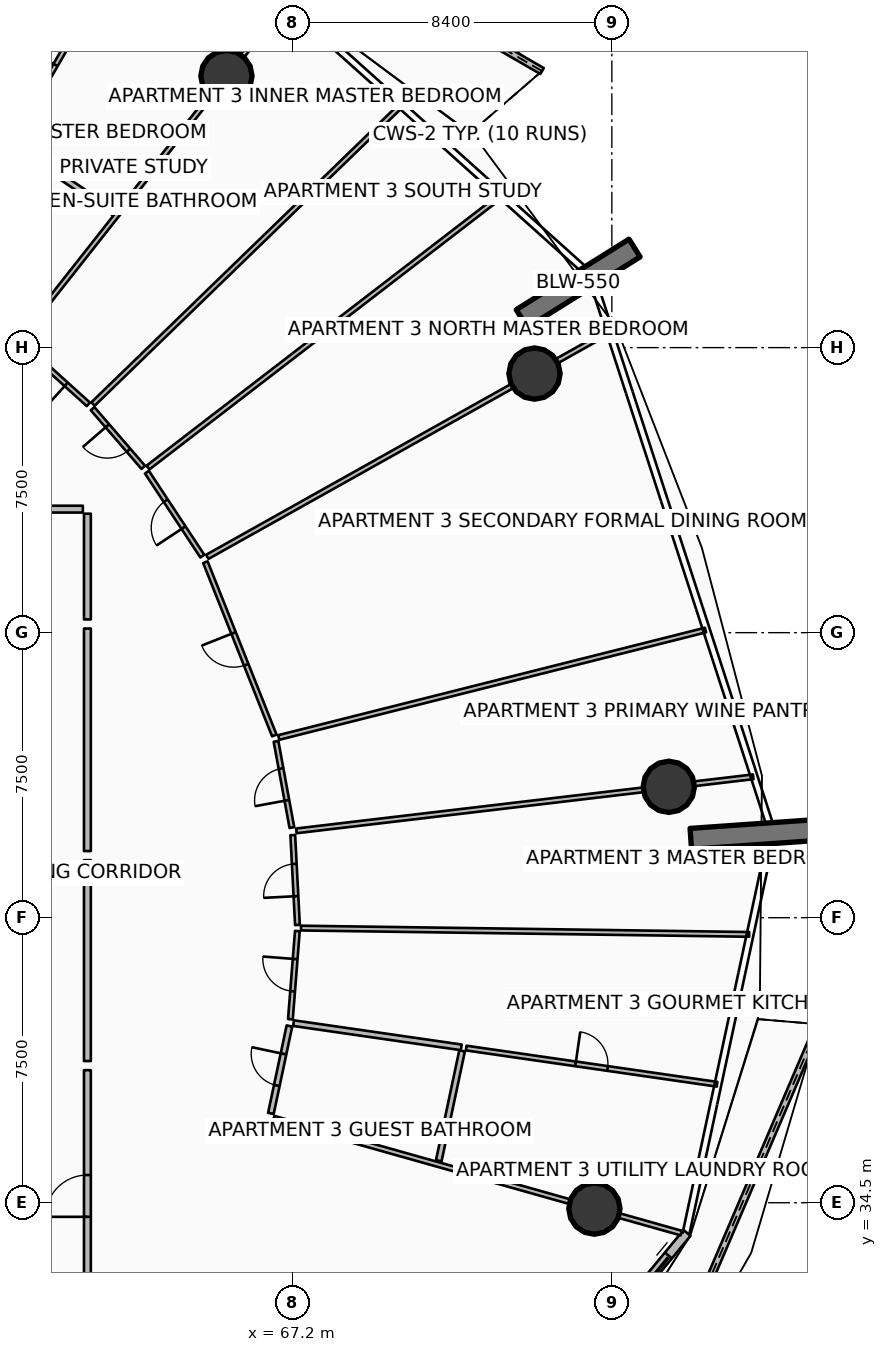
"""IFC4 building model, lengths in metres.
Left out: names, types, materials, properties, quantities, classifications, styles, units other than length and angle.
Written with IfcOpenShell. Run it as: python <this file> out.ifc"""

import sys

from ifc_helpers import new_model, si_unit, direction, frame, frame_2d, origin, origin_2d, place, context, subcontext, project, spatial, polyline, rectangle, circle, outline, extrude, element, fill, save


model = new_model("IFC4")
c1 = context("Model", 3, precision=1e-05, world=origin(), true_north=direction((0.0, 1.0)))
c2 = subcontext(c1, "Body", "Model", "MODEL_VIEW")
j1 = project(units=[si_unit("LENGTHUNIT", "METRE"), si_unit("PLANEANGLEUNIT", "RADIAN")], contexts=[c1])
p1 = place(None, origin())
s1 = spatial("IfcSite", under=j1, at=p1, CompositionType="ELEMENT")
p2 = place(p1, origin())
s2 = spatial("IfcBuilding", under=s1, at=p2, CompositionType="ELEMENT")
p3 = place(p2, frame((0.0, 0.0, 41.4)))
s3 = spatial("IfcBuildingStorey", under=s2, at=p3, CompositionType="ELEMENT", Elevation=41.4)
for number, where, z_axis, x_axis in (
    (1, (73.23, 57.765, 0.0), (0.0, 0.0, 1.0), (0.848, 0.53, 0.0)),
    (2, (77.678, 44.075, 0.0), (0.0, 0.0, 1.0), (0.998, 0.07, 0.0)),
):
    element("IfcWall", number, at=place(p3, frame(where, z_axis=z_axis, x_axis=x_axis)), inside=s3, PredefinedType="SOLIDWALL", context=c2, shape_type="SweptSolid", body=[
        extrude(rectangle(XDim=3.5, YDim=0.55, at=frame_2d((1.75, 0.0))), origin(), (0.0, 0.0, 1.0), 3.75),
    ])
for number, where, z_axis, x_axis in (
    (3, (73.565, 56.317, 0.0), (0.0, 0.0, 1.0), (1.0, 0.0, 0.0)),
    (4, (65.458, 64.146, 0.0), (0.0, 0.0, 1.0), (1.0, 0.0, 0.0)),
    (5, (75.141, 34.345, 0.0), (0.0, 0.0, 1.0), (1.0, 0.0, 0.0)),
    (6, (77.098, 45.444, 0.0), (0.0, 0.0, 1.0), (1.0, 0.0, 0.0)),
):
    element("IfcColumn", number, at=place(p3, frame(where, z_axis=z_axis, x_axis=x_axis)), inside=s3, PredefinedType="COLUMN", context=c2, shape_type="SweptSolid", body=[
        extrude(circle(Radius=0.675, at=origin_2d()), origin(), (0.0, 0.0, 1.0), 3.5),
    ])
p4 = place(p3, frame((73.764, 64.278, 0.0), z_axis=(0.0, 0.0, 1.0), x_axis=(-0.865601166392, 0.500734081865, 0.0)))
e7 = element("IfcWall", 7, at=p4, inside=s3, PredefinedType="PARAPET", context=c2, shape_type="SweptSolid", body=[
    extrude(outline(polyline([(0.0, 0.0), (12.74, 0.0), (12.74, 1.832), (6.37, 1.853), (0.0, 1.756), (0.0, 0.0)])), frame((0.0, 0.09, 0.0), z_axis=(0.0, -1.0, 0.0), x_axis=(1.0, 0.0, 0.0)), (0.0, 0.0, 1.0), 0.18),
])
p5 = place(p3, frame((76.159, 27.786, 0.0), z_axis=(0.0, 0.0, 1.0), x_axis=(0.393762615554, 0.919212164079, 0.0)))
e8 = element("IfcWall", 8, at=p5, inside=s3, PredefinedType="PARAPET", context=c2, shape_type="SweptSolid", body=[
    extrude(outline(polyline([(0.0, 0.0), (12.412, 0.0), (12.412, 1.12), (6.206, 1.182), (0.0, 1.348), (0.0, 0.0)])), frame((0.0, 0.09, 0.0), z_axis=(0.0, -1.0, 0.0), x_axis=(1.0, 0.0, 0.0)), (0.0, 0.0, 1.0), 0.18),
])
p6 = place(p3, frame((70.033, 24.567, 0.0), z_axis=(0.0, 0.0, 1.0), x_axis=(0.636674332663, 0.771132799281, 0.0)))
e9 = element("IfcWall", 9, at=p6, inside=s3, PredefinedType="SOLIDWALL", context=c2, shape_type="SweptSolid", body=[
    extrude(rectangle(XDim=11.851, YDim=0.24, at=frame_2d((5.926, 0.0))), origin(), (0.0, 0.0, 1.0), 2.45),
])
p7 = place(p6, frame((9.631, 0.0, 0.0)))
e10 = element("IfcOpeningElement", 10, at=p7, cuts=e9, PredefinedType="OPENING", context=c2, shape_type="SweptSolid", body=[
    extrude(rectangle(XDim=1.45, YDim=2.15, at=frame_2d((0.725, 1.075))), frame((0.0, 0.13, 0.0), z_axis=(0.0, -1.0, 0.0), x_axis=(1.0, 0.0, 0.0)), (0.0, 0.0, 1.0), 0.26),
])
p8 = place(p6, frame((0.28, 0.0, 0.65)))
e11 = element("IfcOpeningElement", 11, at=p8, cuts=e9, PredefinedType="OPENING", context=c2, shape_type="SweptSolid", body=[
    extrude(rectangle(XDim=1.6, YDim=1.5, at=frame_2d((0.8, 0.75))), frame((0.0, 0.13, 0.0), z_axis=(0.0, -1.0, 0.0), x_axis=(1.0, 0.0, 0.0)), (0.0, 0.0, 1.0), 0.26),
])
p9 = place(p3, frame((61.8, 31.37, 0.0), z_axis=(0.0, 0.0, 1.0), x_axis=(0.0, 1.0, 0.0)))
e12 = element("IfcWall", 12, at=p9, inside=s3, PredefinedType="PARTITIONING", context=c2, shape_type="SweptSolid", body=[
    extrude(rectangle(XDim=6.618, YDim=0.18, at=frame_2d((3.309, 0.0))), origin(), (0.0, 0.0, 1.0), 2.867),
])
p10 = place(p9, frame((2.759, 0.0, 0.0)))
e13 = element("IfcOpeningElement", 13, at=p10, cuts=e12, PredefinedType="OPENING", context=c2, shape_type="SweptSolid", body=[
    extrude(rectangle(XDim=1.1, YDim=2.1, at=frame_2d((0.55, 1.05))), frame((0.0, 0.1, 0.0), z_axis=(0.0, -1.0, 0.0), x_axis=(1.0, 0.0, 0.0)), (0.0, 0.0, 1.0), 0.2),
])
p11 = place(p3, frame((61.8, 38.228, 0.0), z_axis=(0.0, 0.0, 1.0), x_axis=(0.0, 1.0, 0.0)))
e14 = element("IfcWall", 14, at=p11, inside=s3, PredefinedType="PARTITIONING", context=c2, shape_type="SweptSolid", body=[
    extrude(rectangle(XDim=5.285, YDim=0.18, at=frame_2d((2.643, 0.0))), origin(), (0.0, 0.0, 1.0), 2.867),
])
p12 = place(p3, frame((66.703, 36.725, 0.0), z_axis=(0.0, 0.0, 1.0), x_axis=(0.962456868727, -0.271434662195, 0.0)))
e15 = element("IfcWall", 15, at=p12, inside=s3, PredefinedType="PARTITIONING", context=c2, shape_type="SweptSolid", body=[
    extrude(rectangle(XDim=11.141, YDim=0.125, at=frame_2d((5.571, 0.0))), origin(), (0.0, 0.0, 1.0), 2.867),
])
p13 = place(p3, frame((66.628, 36.85, 0.0), z_axis=(0.0, 0.0, 1.0), x_axis=(0.207543347309, 0.978225822082, 0.0)))
e16 = element("IfcWall", 16, at=p13, inside=s3, PredefinedType="PARTITIONING", context=c2, shape_type="SweptSolid", body=[
    extrude(rectangle(XDim=2.352, YDim=0.15, at=frame_2d((1.176, 0.0))), origin(), (0.0, 0.0, 1.0), 2.867),
])
p14 = place(p13, frame((0.751, 0.0, 0.0)))
e17 = element("IfcOpeningElement", 17, at=p14, cuts=e16, PredefinedType="OPENING", context=c2, shape_type="SweptSolid", body=[
    extrude(rectangle(XDim=0.85, YDim=2.06, at=frame_2d((0.425, 1.03))), frame((0.0, 0.085, 0.0), z_axis=(0.0, -1.0, 0.0), x_axis=(1.0, 0.0, 0.0)), (0.0, 0.0, 1.0), 0.17),
])
p15 = place(p3, frame((71.046, 35.604, 0.0), z_axis=(0.0, 0.0, 1.0), x_axis=(0.207542541756, 0.97822599299, 0.0)))
e18 = element("IfcWall", 18, at=p15, inside=s3, PredefinedType="PARTITIONING", context=c2, shape_type="SweptSolid", body=[
    extrude(rectangle(XDim=2.955, YDim=0.15, at=frame_2d((1.478, 0.0))), origin(), (0.0, 0.0, 1.0), 2.867),
])
p16 = place(p3, frame((67.224, 39.226, 0.0), z_axis=(0.0, 0.0, 1.0), x_axis=(0.989741519473, -0.142869607092, 0.0)))
e19 = element("IfcWall", 19, at=p16, inside=s3, PredefinedType="PARTITIONING", context=c2, shape_type="SweptSolid", body=[
    extrude(rectangle(XDim=4.46, YDim=0.15, at=frame_2d((2.23, 0.0))), origin(), (0.0, 0.0, 1.0), 2.94),
])
p17 = place(p3, frame((71.767, 38.57, 0.0), z_axis=(0.0, 0.0, 1.0), x_axis=(0.989747166196, -0.142830483468, 0.0)))
e20 = element("IfcWall", 20, at=p17, inside=s3, PredefinedType="PARTITIONING", context=c2, shape_type="SweptSolid", body=[
    extrude(rectangle(XDim=6.67, YDim=0.125, at=frame_2d((3.335, 0.0))), origin(), (0.0, 0.0, 1.0), 2.94),
])
p18 = place(p17, frame((2.91, 0.0, 0.0)))
e21 = element("IfcOpeningElement", 21, at=p18, cuts=e20, PredefinedType="OPENING", context=c2, shape_type="SweptSolid", body=[
    extrude(rectangle(XDim=0.85, YDim=2.06, at=frame_2d((0.425, 1.03))), frame((0.0, 0.073, 0.0), z_axis=(0.0, -1.0, 0.0), x_axis=(1.0, 0.0, 0.0)), (0.0, 0.0, 1.0), 0.145),
])
p19 = place(p3, frame((67.421, 41.727, 0.0), z_axis=(0.0, 0.0, 1.0), x_axis=(0.999900926594, -0.014076114402, 0.0)))
e22 = element("IfcWall", 22, at=p19, inside=s3, PredefinedType="PARTITIONING", context=c2, shape_type="SweptSolid", body=[
    extrude(rectangle(XDim=11.794, YDim=0.125, at=frame_2d((5.897, 0.0))), origin(), (0.0, 0.0, 1.0), 2.94),
])
p20 = place(p3, frame((67.142, 39.328, 0.0), z_axis=(0.0, 0.0, 1.0), x_axis=(0.078573538032, 0.996908320319, 0.0)))
e23 = element("IfcWall", 23, at=p20, inside=s3, PredefinedType="PARTITIONING", context=c2, shape_type="SweptSolid", body=[
    extrude(rectangle(XDim=2.327, YDim=0.125, at=frame_2d((1.164, 0.0))), origin(), (0.0, 0.0, 1.0), 2.94),
])
p21 = place(p20, frame((0.739, 0.0, 0.0)))
e24 = element("IfcOpeningElement", 24, at=p21, cuts=e23, PredefinedType="OPENING", context=c2, shape_type="SweptSolid", body=[
    extrude(rectangle(XDim=0.85, YDim=2.06, at=frame_2d((0.425, 1.03))), frame((0.0, 0.073, 0.0), z_axis=(0.0, -1.0, 0.0), x_axis=(1.0, 0.0, 0.0)), (0.0, 0.0, 1.0), 0.145),
])
p22 = place(p3, frame((67.327, 41.808, 0.0), z_axis=(0.0, 0.0, 1.0), x_axis=(-0.05186073985, 0.998654326412, 0.0)))
e25 = element("IfcWall", 25, at=p22, inside=s3, PredefinedType="PARTITIONING", context=c2, shape_type="SweptSolid", body=[
    extrude(rectangle(XDim=2.368, YDim=0.125, at=frame_2d((1.184, 0.0))), origin(), (0.0, 0.0, 1.0), 2.867),
])
p23 = place(p22, frame((0.759, 0.0, 0.0)))
e26 = element("IfcOpeningElement", 26, at=p23, cuts=e25, PredefinedType="OPENING", context=c2, shape_type="SweptSolid", body=[
    extrude(rectangle(XDim=0.85, YDim=2.06, at=frame_2d((0.425, 1.03))), frame((0.0, 0.073, 0.0), z_axis=(0.0, -1.0, 0.0), x_axis=(1.0, 0.0, 0.0)), (0.0, 0.0, 1.0), 0.145),
])
p24 = place(p3, frame((61.8, 43.753, 0.0), z_axis=(0.0, 0.0, 1.0), x_axis=(0.0, 1.0, 0.0)))
e27 = element("IfcWall", 27, at=p24, inside=s3, PredefinedType="PARTITIONING", context=c2, shape_type="SweptSolid", body=[
    extrude(rectangle(XDim=5.855, YDim=0.18, at=frame_2d((2.927, 0.0))), origin(), (0.0, 0.0, 1.0), 2.867),
])
p25 = place(p3, frame((67.298, 44.284, 0.0), z_axis=(0.0, 0.0, 1.0), x_axis=(0.993068589749, 0.117536275483, 0.0)))
e28 = element("IfcWall", 28, at=p25, inside=s3, PredefinedType="PARTITIONING", context=c2, shape_type="SweptSolid", body=[
    extrude(rectangle(XDim=12.106, YDim=0.125, at=frame_2d((6.053, 0.0))), origin(), (0.0, 0.0, 1.0), 2.867),
])
p26 = place(p3, frame((66.835, 46.742, 0.0), z_axis=(0.0, 0.0, 1.0), x_axis=(0.96974434054, 0.244122743698, 0.0)))
e29 = element("IfcWall", 29, at=p26, inside=s3, PredefinedType="PARTITIONING", context=c2, shape_type="SweptSolid", body=[
    extrude(rectangle(XDim=11.58, YDim=0.125, at=frame_2d((5.79, 0.0))), origin(), (0.0, 0.0, 1.0), 2.94),
])
p27 = place(p3, frame((67.181, 44.371, 0.0), z_axis=(0.0, 0.0, 1.0), x_axis=(-0.181165121265, 0.98345269273, 0.0)))
e30 = element("IfcWall", 30, at=p27, inside=s3, PredefinedType="PARTITIONING", context=c2, shape_type="SweptSolid", body=[
    extrude(rectangle(XDim=2.308, YDim=0.125, at=frame_2d((1.154, 0.0))), origin(), (0.0, 0.0, 1.0), 2.867),
])
p28 = place(p27, frame((0.729, 0.0, 0.0)))
e31 = element("IfcOpeningElement", 31, at=p28, cuts=e30, PredefinedType="OPENING", context=c2, shape_type="SweptSolid", body=[
    extrude(rectangle(XDim=0.85, YDim=2.06, at=frame_2d((0.425, 1.03))), frame((0.0, 0.073, 0.0), z_axis=(0.0, -1.0, 0.0), x_axis=(1.0, 0.0, 0.0)), (0.0, 0.0, 1.0), 0.145),
])
p29 = place(p3, frame((66.719, 46.794, 0.0), z_axis=(0.0, 0.0, 1.0), x_axis=(-0.369571376039, 0.929202345032, 0.0)))
e32 = element("IfcWall", 32, at=p29, inside=s3, PredefinedType="PARTITIONING", context=c2, shape_type="SweptSolid", body=[
    extrude(rectangle(XDim=4.907, YDim=0.125, at=frame_2d((2.454, 0.0))), origin(), (0.0, 0.0, 1.0), 2.867),
])
p30 = place(p29, frame((2.004, 0.0, 0.0)))
e33 = element("IfcOpeningElement", 33, at=p30, cuts=e32, PredefinedType="OPENING", context=c2, shape_type="SweptSolid", body=[
    extrude(rectangle(XDim=0.9, YDim=2.08, at=frame_2d((0.45, 1.04))), frame((0.0, 0.073, 0.0), z_axis=(0.0, -1.0, 0.0), x_axis=(1.0, 0.0, 0.0)), (0.0, 0.0, 1.0), 0.145),
])
p31 = place(p3, frame((61.8, 49.848, 0.0), z_axis=(0.0, 0.0, 1.0), x_axis=(0.0, 1.0, 0.0)))
e34 = element("IfcWall", 34, at=p31, inside=s3, PredefinedType="PARTITIONING", context=c2, shape_type="SweptSolid", body=[
    extrude(rectangle(XDim=2.781, YDim=0.18, at=frame_2d((1.391, 0.0))), origin(), (0.0, 0.0, 1.0), 2.867),
])
p32 = place(p3, frame((61.68, 52.75, 0.0), z_axis=(0.0, 0.0, 1.0), x_axis=(-1.0, 0.0, 0.0)))
e35 = element("IfcWall", 35, at=p32, inside=s3, PredefinedType="PARTITIONING", context=c2, shape_type="SweptSolid", body=[
    extrude(rectangle(XDim=5.085, YDim=0.18, at=frame_2d((2.543, 0.0))), origin(), (0.0, 0.0, 1.0), 2.867),
])
p33 = place(p3, frame((64.955, 51.495, 0.0), z_axis=(0.0, 0.0, 1.0), x_axis=(0.872499825659, 0.488614422857, 0.0)))
e36 = element("IfcWall", 36, at=p33, inside=s3, PredefinedType="PARTITIONING", context=c2, shape_type="SweptSolid", body=[
    extrude(rectangle(XDim=12.106, YDim=0.125, at=frame_2d((6.053, 0.0))), origin(), (0.0, 0.0, 1.0), 2.867),
])
p34 = place(p3, frame((63.394, 53.844, 0.0), z_axis=(0.0, 0.0, 1.0), x_axis=(0.792561224619, 0.609792345992, 0.0)))
e37 = element("IfcWall", 37, at=p34, inside=s3, PredefinedType="PARTITIONING", context=c2, shape_type="SweptSolid", body=[
    extrude(rectangle(XDim=11.714, YDim=0.125, at=frame_2d((5.857, 0.0))), origin(), (0.0, 0.0, 1.0), 2.94),
])
p35 = place(p3, frame((61.948, 55.517, 0.0), z_axis=(0.0, 0.0, 1.0), x_axis=(0.718127497198, 0.69591155887, 0.0)))
e38 = element("IfcWall", 38, at=p35, inside=s3, PredefinedType="PARTITIONING", context=c2, shape_type="SweptSolid", body=[
    extrude(rectangle(XDim=11.264, YDim=0.125, at=frame_2d((5.632, 0.0))), origin(), (0.0, 0.0, 1.0), 2.94),
])
p36 = place(p3, frame((64.824, 51.513, 0.0), z_axis=(0.0, 0.0, 1.0), x_axis=(-0.550627570513, 0.834751027906, 0.0)))
e39 = element("IfcWall", 39, at=p36, inside=s3, PredefinedType="PARTITIONING", context=c2, shape_type="SweptSolid", body=[
    extrude(rectangle(XDim=2.646, YDim=0.125, at=frame_2d((1.323, 0.0))), origin(), (0.0, 0.0, 1.0), 2.867),
])
p37 = place(p36, frame((0.898, 0.0, 0.0)))
e40 = element("IfcOpeningElement", 40, at=p37, cuts=e39, PredefinedType="OPENING", context=c2, shape_type="SweptSolid", body=[
    extrude(rectangle(XDim=0.85, YDim=2.06, at=frame_2d((0.425, 1.03))), frame((0.0, 0.073, 0.0), z_axis=(0.0, -1.0, 0.0), x_axis=(1.0, 0.0, 0.0)), (0.0, 0.0, 1.0), 0.145),
])
p38 = place(p3, frame((63.27, 53.85, 0.0), z_axis=(0.0, 0.0, 1.0), x_axis=(-0.653978023322, 0.756513545822, 0.0)))
e41 = element("IfcWall", 41, at=p38, inside=s3, PredefinedType="PARTITIONING", context=c2, shape_type="SweptSolid", body=[
    extrude(rectangle(XDim=2.041, YDim=0.125, at=frame_2d((1.02, 0.0))), origin(), (0.0, 0.0, 1.0), 2.94),
])
p39 = place(p38, frame((0.595, 0.0, 0.0)))
e42 = element("IfcOpeningElement", 42, at=p39, cuts=e41, PredefinedType="OPENING", context=c2, shape_type="SweptSolid", body=[
    extrude(rectangle(XDim=0.85, YDim=2.06, at=frame_2d((0.425, 1.03))), frame((0.0, 0.073, 0.0), z_axis=(0.0, -1.0, 0.0), x_axis=(1.0, 0.0, 0.0)), (0.0, 0.0, 1.0), 0.145),
])
p40 = place(p3, frame((61.824, 55.508, 0.0), z_axis=(0.0, 0.0, 1.0), x_axis=(-0.742309867555, 0.670056759185, 0.0)))
e43 = element("IfcWall", 43, at=p40, inside=s3, PredefinedType="PARTITIONING", context=c2, shape_type="SweptSolid", body=[
    extrude(rectangle(XDim=2.419, YDim=0.125, at=frame_2d((1.21, 0.0))), origin(), (0.0, 0.0, 1.0), 2.867),
])
p41 = place(p40, frame((0.785, 0.0, 0.0)))
e44 = element("IfcOpeningElement", 44, at=p41, cuts=e43, PredefinedType="OPENING", context=c2, shape_type="SweptSolid", body=[
    extrude(rectangle(XDim=0.85, YDim=2.06, at=frame_2d((0.425, 1.03))), frame((0.0, 0.073, 0.0), z_axis=(0.0, -1.0, 0.0), x_axis=(1.0, 0.0, 0.0)), (0.0, 0.0, 1.0), 0.145),
])
p42 = place(p3, frame((60.031, 57.261, 0.0), z_axis=(0.0, 0.0, 1.0), x_axis=(0.619090661436, 0.78531952282, 0.0)))
e45 = element("IfcWall", 45, at=p42, inside=s3, PredefinedType="PARTITIONING", context=c2, shape_type="SweptSolid", body=[
    extrude(rectangle(XDim=11.241, YDim=0.125, at=frame_2d((5.621, 0.0))), origin(), (0.0, 0.0, 1.0), 2.867),
])
p43 = place(p3, frame((62.499, 60.553, 0.0), z_axis=(0.0, 0.0, 1.0), x_axis=(-0.827754852397, 0.561089925354, 0.0)))
e46 = element("IfcWall", 46, at=p43, inside=s3, PredefinedType="PARTITIONING", context=c2, shape_type="SweptSolid", body=[
    extrude(rectangle(XDim=3.192, YDim=0.15, at=frame_2d((1.596, 0.0))), origin(), (0.0, 0.0, 1.0), 2.867),
])
p44 = place(p3, frame((59.827, 62.472, 0.0), z_axis=(0.0, 0.0, 1.0), x_axis=(0.500211191889, 0.865903437751, 0.0)))
e47 = element("IfcWall", 47, at=p44, inside=s3, PredefinedType="PARTITIONING", context=c2, shape_type="SweptSolid", body=[
    extrude(rectangle(XDim=5.39, YDim=0.125, at=frame_2d((2.695, 0.0))), origin(), (0.0, 0.0, 1.0), 2.94),
])
p45 = place(p44, frame((2.27, 0.0, 0.0)))
e48 = element("IfcOpeningElement", 48, at=p45, cuts=e47, PredefinedType="OPENING", context=c2, shape_type="SweptSolid", body=[
    extrude(rectangle(XDim=0.85, YDim=2.06, at=frame_2d((0.425, 1.03))), frame((0.0, 0.073, 0.0), z_axis=(0.0, -1.0, 0.0), x_axis=(1.0, 0.0, 0.0)), (0.0, 0.0, 1.0), 0.145),
])
p46 = place(p7, origin())
e49 = element("IfcDoor", 49, at=p46, inside=s3, OperationType="DOUBLE_DOOR_SLIDING", PredefinedType="DOOR", context=c2, shape_type="SweptSolid", body=[
    extrude(rectangle(XDim=1.45, YDim=2.15, at=frame_2d((0.725, 1.075))), frame((0.0, 0.025, 0.0), z_axis=(0.0, -1.0, 0.0), x_axis=(1.0, 0.0, 0.0)), (0.0, 0.0, 1.0), 0.05),
])
fill(e10, e49)
p47 = place(p10, origin())
e50 = element("IfcDoor", 50, at=p47, inside=s3, OperationType="SINGLE_SWING_LEFT", PredefinedType="DOOR", context=c2, shape_type="SweptSolid", body=[
    extrude(rectangle(XDim=1.1, YDim=2.1, at=frame_2d((0.55, 1.05))), frame((0.0, 0.025, 0.0), z_axis=(0.0, -1.0, 0.0), x_axis=(1.0, 0.0, 0.0)), (0.0, 0.0, 1.0), 0.05),
])
fill(e13, e50)
p48 = place(p14, origin())
e51 = element("IfcDoor", 51, at=p48, inside=s3, OperationType="SINGLE_SWING_RIGHT", PredefinedType="DOOR", context=c2, shape_type="SweptSolid", body=[
    extrude(rectangle(XDim=0.85, YDim=2.06, at=frame_2d((0.425, 1.03))), frame((0.0, 0.025, 0.0), z_axis=(0.0, -1.0, 0.0), x_axis=(1.0, 0.0, 0.0)), (0.0, 0.0, 1.0), 0.05),
])
fill(e17, e51)
p49 = place(p18, origin())
e52 = element("IfcDoor", 52, at=p49, inside=s3, OperationType="SINGLE_SWING_LEFT", PredefinedType="DOOR", context=c2, shape_type="SweptSolid", body=[
    extrude(rectangle(XDim=0.85, YDim=2.06, at=frame_2d((0.425, 1.03))), frame((0.0, 0.025, 0.0), z_axis=(0.0, -1.0, 0.0), x_axis=(1.0, 0.0, 0.0)), (0.0, 0.0, 1.0), 0.05),
])
fill(e21, e52)
p50 = place(p21, origin())
e53 = element("IfcDoor", 53, at=p50, inside=s3, OperationType="SINGLE_SWING_RIGHT", PredefinedType="DOOR", context=c2, shape_type="SweptSolid", body=[
    extrude(rectangle(XDim=0.85, YDim=2.06, at=frame_2d((0.425, 1.03))), frame((0.0, 0.025, 0.0), z_axis=(0.0, -1.0, 0.0), x_axis=(1.0, 0.0, 0.0)), (0.0, 0.0, 1.0), 0.05),
])
fill(e24, e53)
p51 = place(p23, origin())
e54 = element("IfcDoor", 54, at=p51, inside=s3, OperationType="SINGLE_SWING_LEFT", PredefinedType="DOOR", context=c2, shape_type="SweptSolid", body=[
    extrude(rectangle(XDim=0.85, YDim=2.06, at=frame_2d((0.425, 1.03))), frame((0.0, 0.025, 0.0), z_axis=(0.0, -1.0, 0.0), x_axis=(1.0, 0.0, 0.0)), (0.0, 0.0, 1.0), 0.05),
])
fill(e26, e54)
p52 = place(p28, origin())
e55 = element("IfcDoor", 55, at=p52, inside=s3, OperationType="SINGLE_SWING_LEFT", PredefinedType="DOOR", context=c2, shape_type="SweptSolid", body=[
    extrude(rectangle(XDim=0.85, YDim=2.06, at=frame_2d((0.425, 1.03))), frame((0.0, 0.025, 0.0), z_axis=(0.0, -1.0, 0.0), x_axis=(1.0, 0.0, 0.0)), (0.0, 0.0, 1.0), 0.05),
])
fill(e31, e55)
p53 = place(p30, origin())
e56 = element("IfcDoor", 56, at=p53, inside=s3, OperationType="SINGLE_SWING_RIGHT", PredefinedType="DOOR", context=c2, shape_type="SweptSolid", body=[
    extrude(rectangle(XDim=0.9, YDim=2.08, at=frame_2d((0.45, 1.04))), frame((0.0, 0.025, 0.0), z_axis=(0.0, -1.0, 0.0), x_axis=(1.0, 0.0, 0.0)), (0.0, 0.0, 1.0), 0.05),
])
fill(e33, e56)
p54 = place(p37, origin())
e57 = element("IfcDoor", 57, at=p54, inside=s3, OperationType="SINGLE_SWING_LEFT", PredefinedType="DOOR", context=c2, shape_type="SweptSolid", body=[
    extrude(rectangle(XDim=0.85, YDim=2.06, at=frame_2d((0.425, 1.03))), frame((0.0, 0.025, 0.0), z_axis=(0.0, -1.0, 0.0), x_axis=(1.0, 0.0, 0.0)), (0.0, 0.0, 1.0), 0.05),
])
fill(e40, e57)
p55 = place(p39, origin())
e58 = element("IfcDoor", 58, at=p55, inside=s3, OperationType="SINGLE_SWING_RIGHT", PredefinedType="DOOR", context=c2, shape_type="SweptSolid", body=[
    extrude(rectangle(XDim=0.85, YDim=2.06, at=frame_2d((0.425, 1.03))), frame((0.0, 0.025, 0.0), z_axis=(0.0, -1.0, 0.0), x_axis=(1.0, 0.0, 0.0)), (0.0, 0.0, 1.0), 0.05),
])
fill(e42, e58)
p56 = place(p41, origin())
e59 = element("IfcDoor", 59, at=p56, inside=s3, OperationType="SINGLE_SWING_LEFT", PredefinedType="DOOR", context=c2, shape_type="SweptSolid", body=[
    extrude(rectangle(XDim=0.85, YDim=2.06, at=frame_2d((0.425, 1.03))), frame((0.0, 0.025, 0.0), z_axis=(0.0, -1.0, 0.0), x_axis=(1.0, 0.0, 0.0)), (0.0, 0.0, 1.0), 0.05),
])
fill(e44, e59)
p57 = place(p45, origin())
e60 = element("IfcDoor", 60, at=p57, inside=s3, OperationType="SINGLE_SWING_RIGHT", PredefinedType="DOOR", context=c2, shape_type="SweptSolid", body=[
    extrude(rectangle(XDim=0.85, YDim=2.06, at=frame_2d((0.425, 1.03))), frame((0.0, 0.025, 0.0), z_axis=(0.0, -1.0, 0.0), x_axis=(1.0, 0.0, 0.0)), (0.0, 0.0, 1.0), 0.05),
])
fill(e48, e60)
save(model, sys.argv[1])
